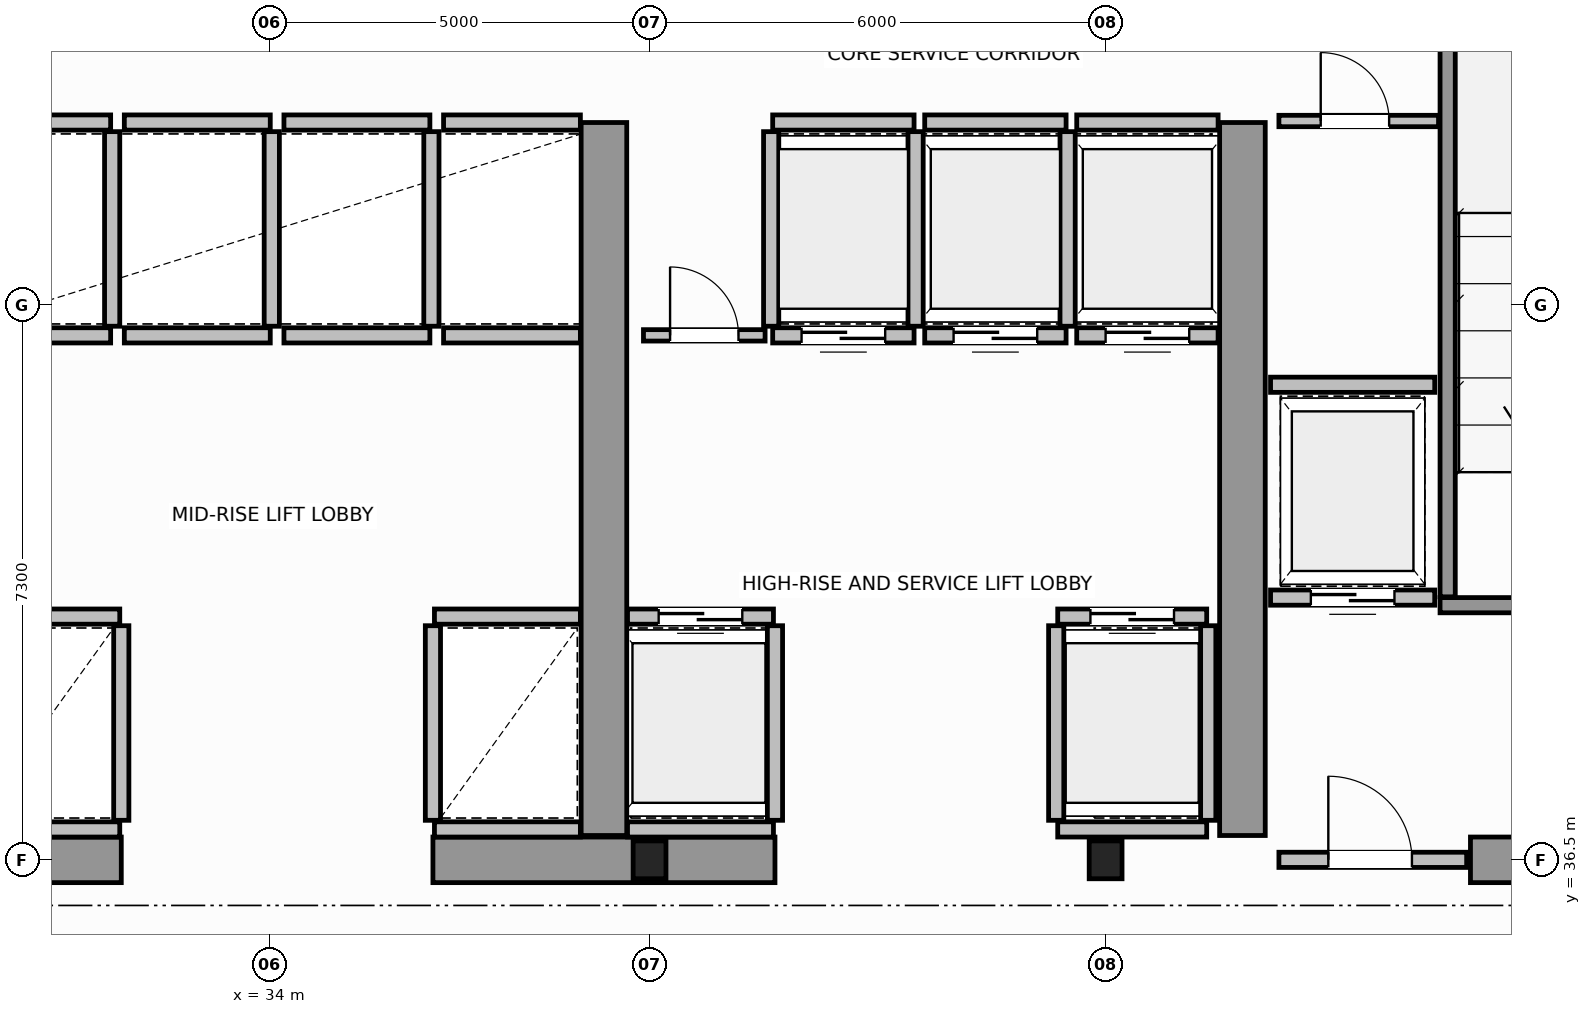
"""IFC4 building model, lengths in metres.
Left out: names, types, materials, properties, quantities, classifications, styles, units other than length and angle.
Written with IfcOpenShell. Run it as: python <this file> out.ifc"""

import sys

from ifc_helpers import new_model, si_unit, direction, frame, frame_2d, origin, origin_2d, place, context, subcontext, project, spatial, rectangle, i_section, extrude, source, transform, mapped, element, fill, save


model = new_model("IFC4")
c1 = context("Model", 3, precision=1e-05, world=origin(), true_north=direction((0.0, 1.0)))
c2 = subcontext(c1, "Body", "Model", "MODEL_VIEW")
j1 = project(units=[si_unit("LENGTHUNIT", "METRE"), si_unit("PLANEANGLEUNIT", "RADIAN")], contexts=[c1])
p1 = place(None, origin())
s1 = spatial("IfcSite", under=j1, at=p1, CompositionType="ELEMENT")
p2 = place(p1, origin())
s2 = spatial("IfcBuilding", under=s1, at=p2, CompositionType="ELEMENT")
p3 = place(p2, frame((0.0, 0.0, 203.2)))
s3 = spatial("IfcBuildingStorey", under=s2, at=p3, CompositionType="ELEMENT", Elevation=203.2)
m1 = source(origin(), c2, "Body", "SweptSolid", [
    extrude(i_section(OverallWidth=0.432, OverallDepth=0.498, WebThickness=0.055, FlangeThickness=0.068, FilletRadius=0.015, at=origin_2d()), origin(), (0.0, 0.0, 1.0), 3.8),
])
for number, where, z_axis, x_axis in (
    (1, (39.0, 36.5, 0.0), (0.0, 0.0, 1.0), (1.0, 0.0, 0.0)),
    (2, (45.0, 36.5, 0.0), (0.0, 0.0, 1.0), (1.0, 0.0, 0.0)),
):
    element("IfcColumn", number, at=place(p3, frame(where, z_axis=z_axis, x_axis=x_axis)), inside=s3, PredefinedType="COLUMN", context=c2, shape_type="MappedRepresentation", body=[
        mapped(m1, transform((0.0, 0.0, 0.0), scale=1.0)),
    ])
for number, where, z_axis, x_axis in (
    (3, (27.55, 36.5, 0.0), (0.0, 0.0, 1.0), (1.0, 0.0, 0.0)),
    (4, (36.15, 36.5, 0.0), (0.0, 0.0, 1.0), (1.0, 0.0, 0.0)),
):
    element("IfcWall", number, at=place(p3, frame(where, z_axis=z_axis, x_axis=x_axis)), inside=s3, PredefinedType="SHEAR", context=c2, shape_type="SweptSolid", body=[
        extrude(rectangle(XDim=4.5, YDim=0.6, at=frame_2d((2.25, 0.0))), origin(), (0.0, 0.0, 1.0), 3.8),
    ])
p4 = place(p3, frame((49.8, 36.5, 0.0), z_axis=(0.0, 0.0, 1.0), x_axis=(1.0, 0.0, 0.0)))
e5 = element("IfcWall", 5, at=p4, inside=s3, PredefinedType="SHEAR", context=c2, shape_type="SweptSolid", body=[
    extrude(rectangle(XDim=3.88, YDim=0.6, at=frame_2d((1.94, 0.0))), origin(), (0.0, 0.0, 1.0), 2.58),
])
for number, where, z_axis, x_axis in (
    (6, (38.4, 36.82, 0.0), (0.0, 0.0, 1.0), (0.0, 1.0, 0.0)),
    (7, (46.8, 36.82, 0.0), (0.0, 0.0, 1.0), (0.0, 1.0, 0.0)),
):
    element("IfcWall", number, at=place(p3, frame(where, z_axis=z_axis, x_axis=x_axis)), inside=s3, PredefinedType="SHEAR", context=c2, shape_type="SweptSolid", body=[
        extrude(rectangle(XDim=9.38, YDim=0.6, at=frame_2d((4.69, 0.0))), origin(), (0.0, 0.0, 1.0), 3.8),
    ])
p5 = place(p3, frame((49.4, 39.85, 0.0), z_axis=(0.0, 0.0, 1.0), x_axis=(1.0, 0.0, 0.0)))
e8 = element("IfcWall", 8, at=p5, inside=s3, PredefinedType="SOLIDWALL", context=c2, shape_type="SweptSolid", body=[
    extrude(rectangle(XDim=4.3, YDim=0.2, at=frame_2d((2.15, 0.0))), origin(), (0.0, 0.0, 1.0), 3.8),
])
p6 = place(p5, frame((1.325, 0.0, 0.0)))
e9 = element("IfcOpeningElement", 9, at=p6, cuts=e8, PredefinedType="OPENING", context=c2, shape_type="SweptSolid", body=[
    extrude(rectangle(XDim=1.1, YDim=2.15, at=frame_2d((0.55, 1.075))), frame((0.0, 0.11, 0.0), z_axis=(0.0, -1.0, 0.0), x_axis=(1.0, 0.0, 0.0)), (0.0, 0.0, 1.0), 0.22),
])
p7 = place(p3, frame((49.5, 39.96, 0.0), z_axis=(0.0, 0.0, 1.0), x_axis=(0.0, 1.0, 0.0)))
e10 = element("IfcWall", 10, at=p7, inside=s3, PredefinedType="SOLIDWALL", context=c2, shape_type="SweptSolid", body=[
    extrude(rectangle(XDim=9.93, YDim=0.2, at=frame_2d((4.965, 0.0))), origin(), (0.0, 0.0, 1.0), 3.8),
])
p8 = place(p3, frame((47.28, 36.5, 0.0), z_axis=(0.0, 0.0, 1.0), x_axis=(1.0, 0.0, 0.0)))
e11 = element("IfcWall", 11, at=p8, inside=s3, PredefinedType="SOLIDWALL", context=c2, shape_type="SweptSolid", body=[
    extrude(rectangle(XDim=2.47, YDim=0.2, at=frame_2d((1.235, 0.0))), origin(), (0.0, 0.0, 1.0), 2.57),
])
p9 = place(p8, frame((0.65, 0.0, 0.0)))
e12 = element("IfcOpeningElement", 12, at=p9, cuts=e11, PredefinedType="OPENING", context=c2, shape_type="SweptSolid", body=[
    extrude(rectangle(XDim=1.1, YDim=2.15, at=frame_2d((0.55, 1.075))), frame((0.0, 0.11, 0.0), z_axis=(0.0, -1.0, 0.0), x_axis=(1.0, 0.0, 0.0)), (0.0, 0.0, 1.0), 0.22),
])
p10 = place(p3, frame((30.11, 39.7, 0.0), z_axis=(0.0, 0.0, 1.0), x_axis=(1.0, 0.0, 0.0)))
e13 = element("IfcWall", 13, at=p10, inside=s3, PredefinedType="SOLIDWALL", context=c2, shape_type="SweptSolid", body=[
    extrude(rectangle(XDim=1.92, YDim=0.2, at=frame_2d((0.96, 0.0))), origin(), (0.0, 0.0, 1.0), 3.58),
])
p11 = place(p3, frame((30.11, 36.9, 0.0), z_axis=(0.0, 0.0, 1.0), x_axis=(1.0, 0.0, 0.0)))
e14 = element("IfcWall", 14, at=p11, inside=s3, PredefinedType="SOLIDWALL", context=c2, shape_type="SweptSolid", body=[
    extrude(rectangle(XDim=1.92, YDim=0.2, at=frame_2d((0.96, 0.0))), origin(), (0.0, 0.0, 1.0), 2.37),
])
p12 = place(p3, frame((32.05, 37.02, 0.0), z_axis=(0.0, 0.0, 1.0), x_axis=(0.0, 1.0, 0.0)))
e15 = element("IfcWall", 15, at=p12, inside=s3, PredefinedType="SOLIDWALL", context=c2, shape_type="SweptSolid", body=[
    extrude(rectangle(XDim=2.56, YDim=0.2, at=frame_2d((1.28, 0.0))), origin(), (0.0, 0.0, 1.0), 3.58),
])
p13 = place(p3, frame((36.17, 39.7, 0.0), z_axis=(0.0, 0.0, 1.0), x_axis=(1.0, 0.0, 0.0)))
e16 = element("IfcWall", 16, at=p13, inside=s3, PredefinedType="SOLIDWALL", context=c2, shape_type="SweptSolid", body=[
    extrude(rectangle(XDim=1.92, YDim=0.2, at=frame_2d((0.96, 0.0))), origin(), (0.0, 0.0, 1.0), 3.58),
])
p14 = place(p3, frame((36.17, 36.9, 0.0), z_axis=(0.0, 0.0, 1.0), x_axis=(1.0, 0.0, 0.0)))
e17 = element("IfcWall", 17, at=p14, inside=s3, PredefinedType="SOLIDWALL", context=c2, shape_type="SweptSolid", body=[
    extrude(rectangle(XDim=1.92, YDim=0.2, at=frame_2d((0.96, 0.0))), origin(), (0.0, 0.0, 1.0), 2.37),
])
p15 = place(p3, frame((36.15, 37.02, 0.0), z_axis=(0.0, 0.0, 1.0), x_axis=(0.0, 1.0, 0.0)))
e18 = element("IfcWall", 18, at=p15, inside=s3, PredefinedType="SOLIDWALL", context=c2, shape_type="SweptSolid", body=[
    extrude(rectangle(XDim=2.56, YDim=0.2, at=frame_2d((1.28, 0.0))), origin(), (0.0, 0.0, 1.0), 3.58),
])
for number, where, z_axis, x_axis in (
    (19, (30.11, 43.4, 0.0), (0.0, 0.0, 1.0), (1.0, 0.0, 0.0)),
    (20, (30.11, 46.2, 0.0), (0.0, 0.0, 1.0), (1.0, 0.0, 0.0)),
):
    element("IfcWall", number, at=place(p3, frame(where, z_axis=z_axis, x_axis=x_axis)), inside=s3, PredefinedType="SOLIDWALL", context=c2, shape_type="SweptSolid", body=[
        extrude(rectangle(XDim=1.8, YDim=0.2, at=frame_2d((0.9, 0.0))), origin(), (0.0, 0.0, 1.0), 3.58),
    ])
p16 = place(p3, frame((31.93, 43.52, 0.0), z_axis=(0.0, 0.0, 1.0), x_axis=(0.0, 1.0, 0.0)))
e21 = element("IfcWall", 21, at=p16, inside=s3, PredefinedType="SOLIDWALL", context=c2, shape_type="SweptSolid", body=[
    extrude(rectangle(XDim=2.56, YDim=0.2, at=frame_2d((1.28, 0.0))), origin(), (0.0, 0.0, 1.0), 3.58),
])
for number, where, z_axis, x_axis in (
    (22, (32.09, 43.4, 0.0), (0.0, 0.0, 1.0), (1.0, 0.0, 0.0)),
    (23, (32.09, 46.2, 0.0), (0.0, 0.0, 1.0), (1.0, 0.0, 0.0)),
):
    element("IfcWall", number, at=place(p3, frame(where, z_axis=z_axis, x_axis=x_axis)), inside=s3, PredefinedType="SOLIDWALL", context=c2, shape_type="SweptSolid", body=[
        extrude(rectangle(XDim=1.92, YDim=0.2, at=frame_2d((0.96, 0.0))), origin(), (0.0, 0.0, 1.0), 3.58),
    ])
p17 = place(p3, frame((34.03, 43.52, 0.0), z_axis=(0.0, 0.0, 1.0), x_axis=(0.0, 1.0, 0.0)))
e24 = element("IfcWall", 24, at=p17, inside=s3, PredefinedType="SOLIDWALL", context=c2, shape_type="SweptSolid", body=[
    extrude(rectangle(XDim=2.56, YDim=0.2, at=frame_2d((1.28, 0.0))), origin(), (0.0, 0.0, 1.0), 3.58),
])
for number, where, z_axis, x_axis in (
    (25, (34.19, 43.4, 0.0), (0.0, 0.0, 1.0), (1.0, 0.0, 0.0)),
    (26, (34.19, 46.2, 0.0), (0.0, 0.0, 1.0), (1.0, 0.0, 0.0)),
):
    element("IfcWall", number, at=place(p3, frame(where, z_axis=z_axis, x_axis=x_axis)), inside=s3, PredefinedType="SOLIDWALL", context=c2, shape_type="SweptSolid", body=[
        extrude(rectangle(XDim=1.92, YDim=0.2, at=frame_2d((0.96, 0.0))), origin(), (0.0, 0.0, 1.0), 3.58),
    ])
p18 = place(p3, frame((36.13, 43.52, 0.0), z_axis=(0.0, 0.0, 1.0), x_axis=(0.0, 1.0, 0.0)))
e27 = element("IfcWall", 27, at=p18, inside=s3, PredefinedType="SOLIDWALL", context=c2, shape_type="SweptSolid", body=[
    extrude(rectangle(XDim=2.56, YDim=0.2, at=frame_2d((1.28, 0.0))), origin(), (0.0, 0.0, 1.0), 3.58),
])
for number, where, z_axis, x_axis in (
    (28, (36.29, 43.4, 0.0), (0.0, 0.0, 1.0), (1.0, 0.0, 0.0)),
    (29, (36.29, 46.2, 0.0), (0.0, 0.0, 1.0), (1.0, 0.0, 0.0)),
):
    element("IfcWall", number, at=place(p3, frame(where, z_axis=z_axis, x_axis=x_axis)), inside=s3, PredefinedType="SOLIDWALL", context=c2, shape_type="SweptSolid", body=[
        extrude(rectangle(XDim=1.8, YDim=0.2, at=frame_2d((0.9, 0.0))), origin(), (0.0, 0.0, 1.0), 3.58),
    ])
p19 = place(p3, frame((38.71, 39.7, 0.0), z_axis=(0.0, 0.0, 1.0), x_axis=(1.0, 0.0, 0.0)))
e30 = element("IfcWall", 30, at=p19, inside=s3, PredefinedType="SOLIDWALL", context=c2, shape_type="SweptSolid", body=[
    extrude(rectangle(XDim=1.92, YDim=0.2, at=frame_2d((0.96, 0.0))), origin(), (0.0, 0.0, 1.0), 3.58),
])
p20 = place(p19, frame((0.41, 0.0, 0.0)))
e31 = element("IfcOpeningElement", 31, at=p20, cuts=e30, PredefinedType="OPENING", context=c2, shape_type="SweptSolid", body=[
    extrude(rectangle(XDim=1.1, YDim=2.15, at=frame_2d((0.55, 1.075))), frame((0.0, 0.11, 0.0), z_axis=(0.0, -1.0, 0.0), x_axis=(1.0, 0.0, 0.0)), (0.0, 0.0, 1.0), 0.22),
])
p21 = place(p3, frame((38.71, 36.9, 0.0), z_axis=(0.0, 0.0, 1.0), x_axis=(1.0, 0.0, 0.0)))
e32 = element("IfcWall", 32, at=p21, inside=s3, PredefinedType="SOLIDWALL", context=c2, shape_type="SweptSolid", body=[
    extrude(rectangle(XDim=1.92, YDim=0.2, at=frame_2d((0.96, 0.0))), origin(), (0.0, 0.0, 1.0), 2.37),
])
p22 = place(p3, frame((40.65, 37.02, 0.0), z_axis=(0.0, 0.0, 1.0), x_axis=(0.0, 1.0, 0.0)))
e33 = element("IfcWall", 33, at=p22, inside=s3, PredefinedType="SOLIDWALL", context=c2, shape_type="SweptSolid", body=[
    extrude(rectangle(XDim=2.56, YDim=0.2, at=frame_2d((1.28, 0.0))), origin(), (0.0, 0.0, 1.0), 3.58),
])
p23 = place(p3, frame((44.37, 39.7, 0.0), z_axis=(0.0, 0.0, 1.0), x_axis=(1.0, 0.0, 0.0)))
e34 = element("IfcWall", 34, at=p23, inside=s3, PredefinedType="SOLIDWALL", context=c2, shape_type="SweptSolid", body=[
    extrude(rectangle(XDim=1.96, YDim=0.2, at=frame_2d((0.98, 0.0))), origin(), (0.0, 0.0, 1.0), 3.58),
])
p24 = place(p23, frame((0.43, 0.0, 0.0)))
e35 = element("IfcOpeningElement", 35, at=p24, cuts=e34, PredefinedType="OPENING", context=c2, shape_type="SweptSolid", body=[
    extrude(rectangle(XDim=1.1, YDim=2.15, at=frame_2d((0.55, 1.075))), frame((0.0, 0.11, 0.0), z_axis=(0.0, -1.0, 0.0), x_axis=(1.0, 0.0, 0.0)), (0.0, 0.0, 1.0), 0.22),
])
p25 = place(p3, frame((44.37, 36.9, 0.0), z_axis=(0.0, 0.0, 1.0), x_axis=(1.0, 0.0, 0.0)))
e36 = element("IfcWall", 36, at=p25, inside=s3, PredefinedType="SOLIDWALL", context=c2, shape_type="SweptSolid", body=[
    extrude(rectangle(XDim=1.96, YDim=0.2, at=frame_2d((0.98, 0.0))), origin(), (0.0, 0.0, 1.0), 2.37),
])
for number, where, z_axis, x_axis in (
    (37, (44.35, 37.02, 0.0), (0.0, 0.0, 1.0), (0.0, 1.0, 0.0)),
    (38, (46.35, 37.02, 0.0), (0.0, 0.0, 1.0), (0.0, 1.0, 0.0)),
):
    element("IfcWall", number, at=place(p3, frame(where, z_axis=z_axis, x_axis=x_axis)), inside=s3, PredefinedType="SOLIDWALL", context=c2, shape_type="SweptSolid", body=[
        extrude(rectangle(XDim=2.56, YDim=0.2, at=frame_2d((1.28, 0.0))), origin(), (0.0, 0.0, 1.0), 3.58),
    ])
p26 = place(p3, frame((40.62, 43.4, 0.0), z_axis=(0.0, 0.0, 1.0), x_axis=(1.0, 0.0, 0.0)))
e39 = element("IfcWall", 39, at=p26, inside=s3, PredefinedType="SOLIDWALL", context=c2, shape_type="SweptSolid", body=[
    extrude(rectangle(XDim=1.86, YDim=0.2, at=frame_2d((0.93, 0.0))), origin(), (0.0, 0.0, 1.0), 3.58),
])
p27 = place(p26, frame((0.38, 0.0, 0.0)))
e40 = element("IfcOpeningElement", 40, at=p27, cuts=e39, PredefinedType="OPENING", context=c2, shape_type="SweptSolid", body=[
    extrude(rectangle(XDim=1.1, YDim=2.15, at=frame_2d((0.55, 1.075))), frame((0.0, 0.11, 0.0), z_axis=(0.0, -1.0, 0.0), x_axis=(1.0, 0.0, 0.0)), (0.0, 0.0, 1.0), 0.22),
])
p28 = place(p3, frame((40.62, 46.2, 0.0), z_axis=(0.0, 0.0, 1.0), x_axis=(1.0, 0.0, 0.0)))
e41 = element("IfcWall", 41, at=p28, inside=s3, PredefinedType="SOLIDWALL", context=c2, shape_type="SweptSolid", body=[
    extrude(rectangle(XDim=1.86, YDim=0.2, at=frame_2d((0.93, 0.0))), origin(), (0.0, 0.0, 1.0), 3.58),
])
for number, where, z_axis, x_axis in (
    (42, (40.6, 43.52, 0.0), (0.0, 0.0, 1.0), (0.0, 1.0, 0.0)),
    (43, (42.5, 43.52, 0.0), (0.0, 0.0, 1.0), (0.0, 1.0, 0.0)),
):
    element("IfcWall", number, at=place(p3, frame(where, z_axis=z_axis, x_axis=x_axis)), inside=s3, PredefinedType="SOLIDWALL", context=c2, shape_type="SweptSolid", body=[
        extrude(rectangle(XDim=2.56, YDim=0.2, at=frame_2d((1.28, 0.0))), origin(), (0.0, 0.0, 1.0), 3.58),
    ])
p29 = place(p3, frame((42.62, 43.4, 0.0), z_axis=(0.0, 0.0, 1.0), x_axis=(1.0, 0.0, 0.0)))
e44 = element("IfcWall", 44, at=p29, inside=s3, PredefinedType="SOLIDWALL", context=c2, shape_type="SweptSolid", body=[
    extrude(rectangle(XDim=1.86, YDim=0.2, at=frame_2d((0.93, 0.0))), origin(), (0.0, 0.0, 1.0), 3.58),
])
p30 = place(p29, frame((0.38, 0.0, 0.0)))
e45 = element("IfcOpeningElement", 45, at=p30, cuts=e44, PredefinedType="OPENING", context=c2, shape_type="SweptSolid", body=[
    extrude(rectangle(XDim=1.1, YDim=2.15, at=frame_2d((0.55, 1.075))), frame((0.0, 0.11, 0.0), z_axis=(0.0, -1.0, 0.0), x_axis=(1.0, 0.0, 0.0)), (0.0, 0.0, 1.0), 0.22),
])
p31 = place(p3, frame((42.62, 46.2, 0.0), z_axis=(0.0, 0.0, 1.0), x_axis=(1.0, 0.0, 0.0)))
e46 = element("IfcWall", 46, at=p31, inside=s3, PredefinedType="SOLIDWALL", context=c2, shape_type="SweptSolid", body=[
    extrude(rectangle(XDim=1.86, YDim=0.2, at=frame_2d((0.93, 0.0))), origin(), (0.0, 0.0, 1.0), 3.58),
])
p32 = place(p3, frame((44.5, 43.52, 0.0), z_axis=(0.0, 0.0, 1.0), x_axis=(0.0, 1.0, 0.0)))
e47 = element("IfcWall", 47, at=p32, inside=s3, PredefinedType="SOLIDWALL", context=c2, shape_type="SweptSolid", body=[
    extrude(rectangle(XDim=2.56, YDim=0.2, at=frame_2d((1.28, 0.0))), origin(), (0.0, 0.0, 1.0), 2.37),
])
p33 = place(p3, frame((44.62, 43.4, 0.0), z_axis=(0.0, 0.0, 1.0), x_axis=(1.0, 0.0, 0.0)))
e48 = element("IfcWall", 48, at=p33, inside=s3, PredefinedType="SOLIDWALL", context=c2, shape_type="SweptSolid", body=[
    extrude(rectangle(XDim=1.86, YDim=0.2, at=frame_2d((0.93, 0.0))), origin(), (0.0, 0.0, 1.0), 3.58),
])
p34 = place(p33, frame((0.38, 0.0, 0.0)))
e49 = element("IfcOpeningElement", 49, at=p34, cuts=e48, PredefinedType="OPENING", context=c2, shape_type="SweptSolid", body=[
    extrude(rectangle(XDim=1.1, YDim=2.15, at=frame_2d((0.55, 1.075))), frame((0.0, 0.11, 0.0), z_axis=(0.0, -1.0, 0.0), x_axis=(1.0, 0.0, 0.0)), (0.0, 0.0, 1.0), 0.22),
])
p35 = place(p3, frame((44.62, 46.2, 0.0), z_axis=(0.0, 0.0, 1.0), x_axis=(1.0, 0.0, 0.0)))
e50 = element("IfcWall", 50, at=p35, inside=s3, PredefinedType="SOLIDWALL", context=c2, shape_type="SweptSolid", body=[
    extrude(rectangle(XDim=1.86, YDim=0.2, at=frame_2d((0.93, 0.0))), origin(), (0.0, 0.0, 1.0), 3.58),
])
p36 = place(p3, frame((47.17, 39.95, 0.0), z_axis=(0.0, 0.0, 1.0), x_axis=(1.0, 0.0, 0.0)))
e51 = element("IfcWall", 51, at=p36, inside=s3, PredefinedType="SOLIDWALL", context=c2, shape_type="SweptSolid", body=[
    extrude(rectangle(XDim=2.16, YDim=0.2, at=frame_2d((1.08, 0.0))), origin(), (0.0, 0.0, 1.0), 3.58),
])
p37 = place(p36, frame((0.53, 0.0, 0.0)))
e52 = element("IfcOpeningElement", 52, at=p37, cuts=e51, PredefinedType="OPENING", context=c2, shape_type="SweptSolid", body=[
    extrude(rectangle(XDim=1.1, YDim=2.15, at=frame_2d((0.55, 1.075))), frame((0.0, 0.11, 0.0), z_axis=(0.0, -1.0, 0.0), x_axis=(1.0, 0.0, 0.0)), (0.0, 0.0, 1.0), 0.22),
])
p38 = place(p3, frame((47.17, 42.75, 0.0), z_axis=(0.0, 0.0, 1.0), x_axis=(1.0, 0.0, 0.0)))
e53 = element("IfcWall", 53, at=p38, inside=s3, PredefinedType="SOLIDWALL", context=c2, shape_type="SweptSolid", body=[
    extrude(rectangle(XDim=2.16, YDim=0.2, at=frame_2d((1.08, 0.0))), origin(), (0.0, 0.0, 1.0), 3.58),
])
p39 = place(p3, frame((47.28, 46.22, 0.0), z_axis=(0.0, 0.0, 1.0), x_axis=(1.0, 0.0, 0.0)))
e54 = element("IfcWall", 54, at=p39, inside=s3, PredefinedType="PARTITIONING", context=c2, shape_type="SweptSolid", body=[
    extrude(rectangle(XDim=2.1, YDim=0.15, at=frame_2d((1.05, 0.0))), origin(), (0.0, 0.0, 1.0), 3.58),
])
p40 = place(p39, frame((0.55, 0.0, 0.0)))
e55 = element("IfcOpeningElement", 55, at=p40, cuts=e54, PredefinedType="OPENING", context=c2, shape_type="SweptSolid", body=[
    extrude(rectangle(XDim=0.9, YDim=2.1, at=frame_2d((0.45, 1.05))), frame((0.0, 0.085, 0.0), z_axis=(0.0, -1.0, 0.0), x_axis=(1.0, 0.0, 0.0)), (0.0, 0.0, 1.0), 0.17),
])
p41 = place(p3, frame((38.92, 43.4, 0.0), z_axis=(0.0, 0.0, 1.0), x_axis=(1.0, 0.0, 0.0)))
e56 = element("IfcWall", 56, at=p41, inside=s3, PredefinedType="PARTITIONING", context=c2, shape_type="SweptSolid", body=[
    extrude(rectangle(XDim=1.6, YDim=0.15, at=frame_2d((0.8, 0.0))), origin(), (0.0, 0.0, 1.0), 3.58),
])
p42 = place(p41, frame((0.35, 0.0, 0.0)))
e57 = element("IfcOpeningElement", 57, at=p42, cuts=e56, PredefinedType="OPENING", context=c2, shape_type="SweptSolid", body=[
    extrude(rectangle(XDim=0.9, YDim=2.1, at=frame_2d((0.45, 1.05))), frame((0.0, 0.085, 0.0), z_axis=(0.0, -1.0, 0.0), x_axis=(1.0, 0.0, 0.0)), (0.0, 0.0, 1.0), 0.17),
])
m2 = source(origin(), c2, "Body", "SweptSolid", [
    extrude(rectangle(XDim=1.1, YDim=2.15, at=frame_2d((0.55, 1.075))), frame((0.0, 0.025, 0.0), z_axis=(0.0, -1.0, 0.0), x_axis=(1.0, 0.0, 0.0)), (0.0, 0.0, 1.0), 0.05),
])
p43 = place(p9, origin())
e58 = element("IfcDoor", 58, at=p43, inside=s3, OperationType="SINGLE_SWING_LEFT", PredefinedType="DOOR", context=c2, shape_type="MappedRepresentation", body=[
    mapped(m2, transform((0.0, 0.0, 0.0), scale=1.0)),
])
fill(e12, e58)
p44 = place(p20, origin())
e59 = element("IfcDoor", 59, at=p44, inside=s3, OperationType="DOUBLE_DOOR_SLIDING", PredefinedType="DOOR", context=c2, shape_type="MappedRepresentation", body=[
    mapped(m2, transform((0.0, 0.0, 0.0), scale=1.0)),
])
fill(e31, e59)
p45 = place(p24, origin())
e60 = element("IfcDoor", 60, at=p45, inside=s3, OperationType="DOUBLE_DOOR_SLIDING", PredefinedType="DOOR", context=c2, shape_type="MappedRepresentation", body=[
    mapped(m2, transform((0.0, 0.0, 0.0), scale=1.0)),
])
fill(e35, e60)
p46 = place(p27, origin())
e61 = element("IfcDoor", 61, at=p46, inside=s3, OperationType="DOUBLE_DOOR_SLIDING", PredefinedType="DOOR", context=c2, shape_type="MappedRepresentation", body=[
    mapped(m2, transform((0.0, 0.0, 0.0), scale=1.0)),
])
fill(e40, e61)
p47 = place(p30, origin())
e62 = element("IfcDoor", 62, at=p47, inside=s3, OperationType="DOUBLE_DOOR_SLIDING", PredefinedType="DOOR", context=c2, shape_type="MappedRepresentation", body=[
    mapped(m2, transform((0.0, 0.0, 0.0), scale=1.0)),
])
fill(e45, e62)
p48 = place(p34, origin())
e63 = element("IfcDoor", 63, at=p48, inside=s3, OperationType="DOUBLE_DOOR_SLIDING", PredefinedType="DOOR", context=c2, shape_type="MappedRepresentation", body=[
    mapped(m2, transform((0.0, 0.0, 0.0), scale=1.0)),
])
fill(e49, e63)
p49 = place(p37, origin())
e64 = element("IfcDoor", 64, at=p49, inside=s3, OperationType="DOUBLE_DOOR_SLIDING", PredefinedType="DOOR", context=c2, shape_type="MappedRepresentation", body=[
    mapped(m2, transform((0.0, 0.0, 0.0), scale=1.0)),
])
fill(e52, e64)
m3 = source(origin(), c2, "Body", "SweptSolid", [
    extrude(rectangle(XDim=0.9, YDim=2.1, at=frame_2d((0.45, 1.05))), frame((0.0, 0.025, 0.0), z_axis=(0.0, -1.0, 0.0), x_axis=(1.0, 0.0, 0.0)), (0.0, 0.0, 1.0), 0.05),
])
p50 = place(p40, origin())
e65 = element("IfcDoor", 65, at=p50, inside=s3, OperationType="SINGLE_SWING_RIGHT", PredefinedType="DOOR", context=c2, shape_type="MappedRepresentation", body=[
    mapped(m3, transform((0.0, 0.0, 0.0), scale=1.0)),
])
fill(e55, e65)
p51 = place(p42, origin())
e66 = element("IfcDoor", 66, at=p51, inside=s3, OperationType="SINGLE_SWING_LEFT", PredefinedType="DOOR", context=c2, shape_type="MappedRepresentation", body=[
    mapped(m3, transform((0.0, 0.0, 0.0), scale=1.0)),
])
fill(e57, e66)
save(model, sys.argv[1])
